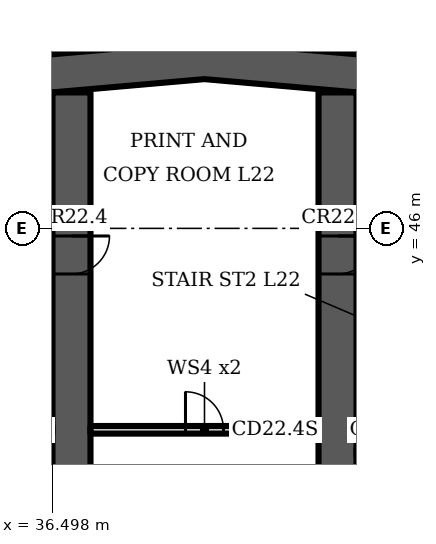
"""IFC4 building model, lengths in metres.
Left out: names, types, materials, properties, quantities, classifications, styles, units other than length and angle.
Written with IfcOpenShell. Run it as: python <this file> out.ifc"""

import sys

from ifc_helpers import new_model, si_unit, direction, frame, frame_2d, origin, place, context, subcontext, project, spatial, polyline, rectangle, outline, extrude, element, fill, save


model = new_model("IFC4")
c1 = context("Model", 3, precision=1e-05, world=origin(), true_north=direction((0.0, 1.0)))
c2 = subcontext(c1, "Body", "Model", "MODEL_VIEW")
j1 = project(units=[si_unit("LENGTHUNIT", "METRE"), si_unit("PLANEANGLEUNIT", "RADIAN")], contexts=[c1])
p1 = place(None, origin())
s1 = spatial("IfcSite", under=j1, at=p1, CompositionType="ELEMENT")
p2 = place(p1, origin())
s2 = spatial("IfcBuilding", under=s1, at=p2, CompositionType="ELEMENT")
p3 = place(p2, frame((0.0, 0.0, 100.3)))
s3 = spatial("IfcBuildingStorey", under=s2, at=p3, CompositionType="ELEMENT", Elevation=100.3)
p4 = place(p3, frame((0.0, 0.0, -0.0)))
e1 = element("IfcWall", 1, at=p4, inside=s3, PredefinedType="SHEAR", context=c2, shape_type="SweptSolid", body=[
    extrude(outline(polyline([(16.0, 47.784), (40.5, 49.927), (65.0, 47.784), (65.0, 48.787), (40.5, 50.931), (16.0, 48.787), (16.0, 47.784)])), origin(), (0.0, 0.0, 1.0), 3.6),
])
p5 = place(p3, frame((37.0, 35.0, 0.0), z_axis=(0.0, 0.0, 1.0), x_axis=(0.0, 1.0, 0.0)))
e2 = element("IfcWall", 2, at=p5, inside=s3, PredefinedType="SHEAR", context=c2, shape_type="SweptSolid", body=[
    extrude(rectangle(XDim=14.577, YDim=1.0, at=frame_2d((7.289, 0.0))), origin(), (0.0, 0.0, 1.0), 3.6),
])
p6 = place(p5, frame((3.4, 0.0, 0.0)))
e3 = element("IfcOpeningElement", 3, at=p6, cuts=e2, PredefinedType="OPENING", context=c2, shape_type="SweptSolid", body=[
    extrude(rectangle(XDim=1.1, YDim=2.1, at=frame_2d((0.55, 1.05))), frame((0.0, 0.51, 0.0), z_axis=(0.0, -1.0, 0.0), x_axis=(1.0, 0.0, 0.0)), (0.0, 0.0, 1.0), 1.02),
])
p7 = place(p5, frame((9.8, 0.0, 0.0)))
e4 = element("IfcOpeningElement", 4, at=p7, cuts=e2, PredefinedType="OPENING", context=c2, shape_type="SweptSolid", body=[
    extrude(rectangle(XDim=1.0, YDim=2.1, at=frame_2d((0.5, 1.05))), frame((0.0, 0.51, 0.0), z_axis=(0.0, -1.0, 0.0), x_axis=(1.0, 0.0, 0.0)), (0.0, 0.0, 1.0), 1.02),
])
p8 = place(p3, frame((44.0, 35.0, 0.0), z_axis=(0.0, 0.0, 1.0), x_axis=(0.0, 1.0, 0.0)))
e5 = element("IfcWall", 5, at=p8, inside=s3, PredefinedType="SHEAR", context=c2, shape_type="SweptSolid", body=[
    extrude(rectangle(XDim=14.577, YDim=1.0, at=frame_2d((7.289, 0.0))), origin(), (0.0, 0.0, 1.0), 3.6),
])
p9 = place(p8, frame((3.4, 0.0, 0.0)))
e6 = element("IfcOpeningElement", 6, at=p9, cuts=e5, PredefinedType="OPENING", context=c2, shape_type="SweptSolid", body=[
    extrude(rectangle(XDim=1.1, YDim=2.1, at=frame_2d((0.55, 1.05))), frame((0.0, 0.51, 0.0), z_axis=(0.0, -1.0, 0.0), x_axis=(1.0, 0.0, 0.0)), (0.0, 0.0, 1.0), 1.02),
])
p10 = place(p8, frame((9.8, 0.0, 0.0)))
e7 = element("IfcOpeningElement", 7, at=p10, cuts=e5, PredefinedType="OPENING", context=c2, shape_type="SweptSolid", body=[
    extrude(rectangle(XDim=1.0, YDim=2.1, at=frame_2d((0.5, 1.05))), frame((0.0, 0.51, 0.0), z_axis=(0.0, -1.0, 0.0), x_axis=(1.0, 0.0, 0.0)), (0.0, 0.0, 1.0), 1.02),
])
p11 = place(p3, frame((37.5, 40.7, 0.0), z_axis=(0.0, 0.0, 1.0), x_axis=(1.0, 0.0, 0.0)))
e8 = element("IfcWall", 8, at=p11, inside=s3, PredefinedType="PARTITIONING", context=c2, shape_type="SweptSolid", body=[
    extrude(rectangle(XDim=6.0, YDim=0.2, at=frame_2d((3.0, 0.0))), origin(), (0.0, 0.0, 1.0), 3.2),
])
p12 = place(p11, frame((2.5, 0.0, 0.0)))
e9 = element("IfcOpeningElement", 9, at=p12, cuts=e8, PredefinedType="OPENING", context=c2, shape_type="SweptSolid", body=[
    extrude(rectangle(XDim=1.0, YDim=2.1, at=frame_2d((0.5, 1.05))), frame((0.0, 0.11, 0.0), z_axis=(0.0, -1.0, 0.0), x_axis=(1.0, 0.0, 0.0)), (0.0, 0.0, 1.0), 0.22),
])
p13 = place(p12, origin())
e10 = element("IfcDoor", 10, at=p13, inside=s3, OperationType="SINGLE_SWING_LEFT", PredefinedType="DOOR", context=c2, shape_type="SweptSolid", body=[
    extrude(rectangle(XDim=1.0, YDim=2.1, at=frame_2d((0.5, 1.05))), frame((0.0, 0.025, 0.0), z_axis=(0.0, -1.0, 0.0), x_axis=(1.0, 0.0, 0.0)), (0.0, 0.0, 1.0), 0.05),
])
fill(e9, e10)
p14 = place(p7, origin())
e11 = element("IfcDoor", 11, at=p14, inside=s3, OperationType="SINGLE_SWING_RIGHT", PredefinedType="DOOR", context=c2, shape_type="SweptSolid", body=[
    extrude(rectangle(XDim=1.0, YDim=2.1, at=frame_2d((0.5, 1.05))), frame((0.0, 0.5, 0.0), z_axis=(0.0, -1.0, 0.0), x_axis=(1.0, 0.0, 0.0)), (0.0, 0.0, 1.0), 1.0),
])
fill(e4, e11)
p15 = place(p10, origin())
e12 = element("IfcDoor", 12, at=p15, inside=s3, OperationType="SINGLE_SWING_RIGHT", PredefinedType="DOOR", context=c2, shape_type="SweptSolid", body=[
    extrude(rectangle(XDim=1.0, YDim=2.1, at=frame_2d((0.5, 1.05))), frame((0.0, 0.5, 0.0), z_axis=(0.0, -1.0, 0.0), x_axis=(1.0, 0.0, 0.0)), (0.0, 0.0, 1.0), 1.0),
])
fill(e7, e12)
save(model, sys.argv[1])
